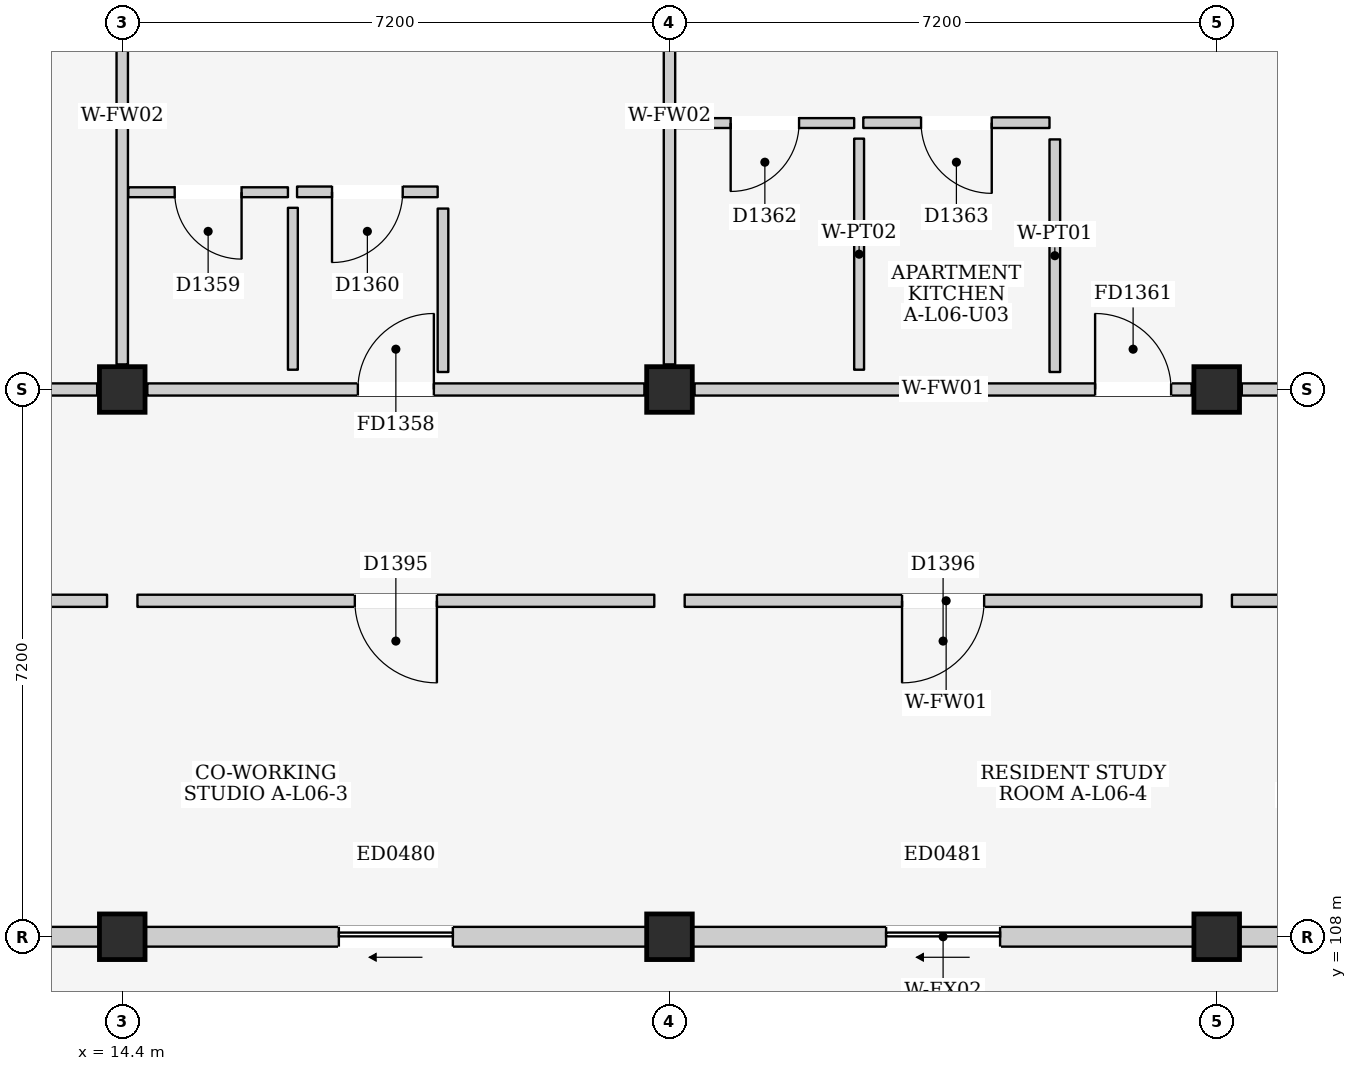
"""IFC4 building model, lengths in metres.
Left out: names, types, materials, properties, quantities, classifications, styles, units other than length and angle.
Written with IfcOpenShell. Run it as: python <this file> out.ifc"""

import sys

from ifc_helpers import new_model, si_unit, direction, frame, frame_2d, origin, origin_2d, place, context, subcontext, project, spatial, rectangle, extrude, element, fill, save


model = new_model("IFC4")
c1 = context("Model", 3, precision=1e-05, world=origin(), true_north=direction((0.0, 1.0)))
c2 = subcontext(c1, "Body", "Model", "MODEL_VIEW")
j1 = project(units=[si_unit("LENGTHUNIT", "METRE"), si_unit("PLANEANGLEUNIT", "RADIAN")], contexts=[c1])
p1 = place(None, origin())
s1 = spatial("IfcSite", under=j1, at=p1, CompositionType="ELEMENT")
p2 = place(p1, origin())
s2 = spatial("IfcBuilding", under=s1, at=p2, CompositionType="ELEMENT")
p3 = place(p2, frame((0.0, 0.0, 21.9)))
s3 = spatial("IfcBuildingStorey", under=s2, at=p3, CompositionType="ELEMENT", Elevation=21.9)
for number, where, z_axis, x_axis in (
    (1, (14.4, 108.0, 0.0), (0.0, 0.0, 1.0), (1.0, 0.0, 0.0)),
    (2, (14.4, 115.2, 0.0), (0.0, 0.0, 1.0), (1.0, 0.0, 0.0)),
    (3, (21.6, 108.0, 0.0), (0.0, 0.0, 1.0), (1.0, 0.0, 0.0)),
    (4, (21.6, 115.2, 0.0), (0.0, 0.0, 1.0), (1.0, 0.0, 0.0)),
    (5, (28.8, 108.0, 0.0), (0.0, 0.0, 1.0), (1.0, 0.0, 0.0)),
    (6, (28.8, 115.2, 0.0), (0.0, 0.0, 1.0), (1.0, 0.0, 0.0)),
):
    element("IfcColumn", number, at=place(p3, frame(where, z_axis=z_axis, x_axis=x_axis)), inside=s3, PredefinedType="COLUMN", context=c2, shape_type="SweptSolid", body=[
        extrude(rectangle(XDim=0.6, YDim=0.6, at=origin_2d()), origin(), (0.0, 0.0, 1.0), 3.2),
    ])
p4 = place(p3, frame((7.5, 108.0, 0.0), z_axis=(0.0, 0.0, 1.0), x_axis=(1.0, 0.0, 0.0)))
e7 = element("IfcWall", 7, at=p4, inside=s3, PredefinedType="ELEMENTEDWALL", context=c2, shape_type="SweptSolid", body=[
    extrude(rectangle(XDim=6.6, YDim=0.26, at=frame_2d((3.3, 0.0))), origin(), (0.0, 0.0, 1.0), 2.315),
])
p5 = place(p4, frame((2.55, 0.0, 0.0)))
e8 = element("IfcOpeningElement", 8, at=p5, cuts=e7, PredefinedType="OPENING", context=c2, shape_type="SweptSolid", body=[
    extrude(rectangle(XDim=1.5, YDim=2.12, at=frame_2d((0.75, 1.06))), frame((0.0, 0.145, 0.0), z_axis=(0.0, -1.0, 0.0), x_axis=(1.0, 0.0, 0.0)), (0.0, 0.0, 1.0), 0.29),
])
p6 = place(p3, frame((14.7, 108.0, 0.0), z_axis=(0.0, 0.0, 1.0), x_axis=(1.0, 0.0, 0.0)))
e9 = element("IfcWall", 9, at=p6, inside=s3, PredefinedType="ELEMENTEDWALL", context=c2, shape_type="SweptSolid", body=[
    extrude(rectangle(XDim=6.6, YDim=0.26, at=frame_2d((3.3, 0.0))), origin(), (0.0, 0.0, 1.0), 2.315),
])
p7 = place(p6, frame((2.55, 0.0, 0.0)))
e10 = element("IfcOpeningElement", 10, at=p7, cuts=e9, PredefinedType="OPENING", context=c2, shape_type="SweptSolid", body=[
    extrude(rectangle(XDim=1.5, YDim=2.12, at=frame_2d((0.75, 1.06))), frame((0.0, 0.145, 0.0), z_axis=(0.0, -1.0, 0.0), x_axis=(1.0, 0.0, 0.0)), (0.0, 0.0, 1.0), 0.29),
])
p8 = place(p3, frame((21.9, 108.0, 0.0), z_axis=(0.0, 0.0, 1.0), x_axis=(1.0, 0.0, 0.0)))
e11 = element("IfcWall", 11, at=p8, inside=s3, PredefinedType="ELEMENTEDWALL", context=c2, shape_type="SweptSolid", body=[
    extrude(rectangle(XDim=6.6, YDim=0.26, at=frame_2d((3.3, 0.0))), origin(), (0.0, 0.0, 1.0), 2.315),
])
p9 = place(p8, frame((2.55, 0.0, 0.0)))
e12 = element("IfcOpeningElement", 12, at=p9, cuts=e11, PredefinedType="OPENING", context=c2, shape_type="SweptSolid", body=[
    extrude(rectangle(XDim=1.5, YDim=2.12, at=frame_2d((0.75, 1.06))), frame((0.0, 0.145, 0.0), z_axis=(0.0, -1.0, 0.0), x_axis=(1.0, 0.0, 0.0)), (0.0, 0.0, 1.0), 0.29),
])
p10 = place(p3, frame((29.1, 108.0, 0.0), z_axis=(0.0, 0.0, 1.0), x_axis=(1.0, 0.0, 0.0)))
e13 = element("IfcWall", 13, at=p10, inside=s3, PredefinedType="ELEMENTEDWALL", context=c2, shape_type="SweptSolid", body=[
    extrude(rectangle(XDim=6.6, YDim=0.26, at=frame_2d((3.3, 0.0))), origin(), (0.0, 0.0, 1.0), 2.315),
])
p11 = place(p10, frame((2.55, 0.0, 0.0)))
e14 = element("IfcOpeningElement", 14, at=p11, cuts=e13, PredefinedType="OPENING", context=c2, shape_type="SweptSolid", body=[
    extrude(rectangle(XDim=1.5, YDim=2.12, at=frame_2d((0.75, 1.06))), frame((0.0, 0.145, 0.0), z_axis=(0.0, -1.0, 0.0), x_axis=(1.0, 0.0, 0.0)), (0.0, 0.0, 1.0), 0.29),
])
p12 = place(p3, frame((7.53, 115.2, 0.0), z_axis=(0.0, 0.0, 1.0), x_axis=(1.0, 0.0, 0.0)))
e15 = element("IfcWall", 15, at=p12, inside=s3, PredefinedType="PARTITIONING", context=c2, shape_type="SweptSolid", body=[
    extrude(rectangle(XDim=6.54, YDim=0.16, at=frame_2d((3.27, 0.0))), origin(), (0.0, 0.0, 1.0), 2.315),
])
p13 = place(p12, frame((2.77, 0.0, 0.0)))
e16 = element("IfcOpeningElement", 16, at=p13, cuts=e15, PredefinedType="OPENING", context=c2, shape_type="SweptSolid", body=[
    extrude(rectangle(XDim=1.0, YDim=2.15, at=frame_2d((0.5, 1.075))), frame((0.0, 0.095, 0.0), z_axis=(0.0, -1.0, 0.0), x_axis=(1.0, 0.0, 0.0)), (0.0, 0.0, 1.0), 0.19),
])
p14 = place(p3, frame((14.4, 115.53, 0.0), z_axis=(0.0, 0.0, 1.0), x_axis=(0.0, 1.0, 0.0)))
e17 = element("IfcWall", 17, at=p14, inside=s3, PredefinedType="PARTITIONING", context=c2, shape_type="SweptSolid", body=[
    extrude(rectangle(XDim=6.54, YDim=0.15, at=frame_2d((3.27, 0.0))), origin(), (0.0, 0.0, 1.0), 2.465),
])
p15 = place(p3, frame((14.73, 115.2, 0.0), z_axis=(0.0, 0.0, 1.0), x_axis=(1.0, 0.0, 0.0)))
e18 = element("IfcWall", 18, at=p15, inside=s3, PredefinedType="PARTITIONING", context=c2, shape_type="SweptSolid", body=[
    extrude(rectangle(XDim=6.54, YDim=0.16, at=frame_2d((3.27, 0.0))), origin(), (0.0, 0.0, 1.0), 2.315),
])
p16 = place(p15, frame((2.77, 0.0, 0.0)))
e19 = element("IfcOpeningElement", 19, at=p16, cuts=e18, PredefinedType="OPENING", context=c2, shape_type="SweptSolid", body=[
    extrude(rectangle(XDim=1.0, YDim=2.15, at=frame_2d((0.5, 1.075))), frame((0.0, 0.095, 0.0), z_axis=(0.0, -1.0, 0.0), x_axis=(1.0, 0.0, 0.0)), (0.0, 0.0, 1.0), 0.19),
])
p17 = place(p3, frame((21.6, 115.53, 0.0), z_axis=(0.0, 0.0, 1.0), x_axis=(0.0, 1.0, 0.0)))
e20 = element("IfcWall", 20, at=p17, inside=s3, PredefinedType="PARTITIONING", context=c2, shape_type="SweptSolid", body=[
    extrude(rectangle(XDim=6.54, YDim=0.15, at=frame_2d((3.27, 0.0))), origin(), (0.0, 0.0, 1.0), 2.465),
])
p18 = place(p3, frame((14.48, 117.795, 0.0), z_axis=(0.0, 0.0, 1.0), x_axis=(1.0, 0.0, 0.0)))
e21 = element("IfcWall", 21, at=p18, inside=s3, PredefinedType="PARTITIONING", context=c2, shape_type="SweptSolid", body=[
    extrude(rectangle(XDim=2.1, YDim=0.13, at=frame_2d((1.05, 0.0))), origin(), (0.0, 0.0, 1.0), 2.98),
])
p19 = place(p18, frame((0.61, 0.0, 0.0)))
e22 = element("IfcOpeningElement", 22, at=p19, cuts=e21, PredefinedType="OPENING", context=c2, shape_type="SweptSolid", body=[
    extrude(rectangle(XDim=0.88, YDim=2.1, at=frame_2d((0.44, 1.05))), frame((0.0, 0.08, 0.0), z_axis=(0.0, -1.0, 0.0), x_axis=(1.0, 0.0, 0.0)), (0.0, 0.0, 1.0), 0.16),
])
p20 = place(p3, frame((16.645, 115.46, 0.0), z_axis=(0.0, 0.0, 1.0), x_axis=(0.0, 1.0, 0.0)))
e23 = element("IfcWall", 23, at=p20, inside=s3, PredefinedType="PARTITIONING", context=c2, shape_type="SweptSolid", body=[
    extrude(rectangle(XDim=2.13, YDim=0.13, at=frame_2d((1.065, 0.0))), origin(), (0.0, 0.0, 1.0), 2.98),
])
p21 = place(p3, frame((16.7, 117.8, 0.0), z_axis=(0.0, 0.0, 1.0), x_axis=(1.0, 0.0, 0.0)))
e24 = element("IfcWall", 24, at=p21, inside=s3, PredefinedType="PARTITIONING", context=c2, shape_type="SweptSolid", body=[
    extrude(rectangle(XDim=1.85, YDim=0.14, at=frame_2d((0.925, 0.0))), origin(), (0.0, 0.0, 1.0), 2.98),
])
p22 = place(p21, frame((0.46, 0.0, 0.0)))
e25 = element("IfcOpeningElement", 25, at=p22, cuts=e24, PredefinedType="OPENING", context=c2, shape_type="SweptSolid", body=[
    extrude(rectangle(XDim=0.93, YDim=2.14, at=frame_2d((0.465, 1.07))), frame((0.0, 0.085, 0.0), z_axis=(0.0, -1.0, 0.0), x_axis=(1.0, 0.0, 0.0)), (0.0, 0.0, 1.0), 0.17),
])
p23 = place(p3, frame((18.62, 115.43, 0.0), z_axis=(0.0, 0.0, 1.0), x_axis=(0.0, 1.0, 0.0)))
e26 = element("IfcWall", 26, at=p23, inside=s3, PredefinedType="PARTITIONING", context=c2, shape_type="SweptSolid", body=[
    extrude(rectangle(XDim=2.15, YDim=0.14, at=frame_2d((1.075, 0.0))), origin(), (0.0, 0.0, 1.0), 2.98),
])
p24 = place(p3, frame((21.93, 115.2, 0.0), z_axis=(0.0, 0.0, 1.0), x_axis=(1.0, 0.0, 0.0)))
e27 = element("IfcWall", 27, at=p24, inside=s3, PredefinedType="PARTITIONING", context=c2, shape_type="SweptSolid", body=[
    extrude(rectangle(XDim=6.54, YDim=0.16, at=frame_2d((3.27, 0.0))), origin(), (0.0, 0.0, 1.0), 2.315),
])
p25 = place(p24, frame((5.27, 0.0, 0.0)))
e28 = element("IfcOpeningElement", 28, at=p25, cuts=e27, PredefinedType="OPENING", context=c2, shape_type="SweptSolid", body=[
    extrude(rectangle(XDim=1.0, YDim=2.15, at=frame_2d((0.5, 1.075))), frame((0.0, 0.095, 0.0), z_axis=(0.0, -1.0, 0.0), x_axis=(1.0, 0.0, 0.0)), (0.0, 0.0, 1.0), 0.19),
])
p26 = place(p3, frame((29.13, 115.2, 0.0), z_axis=(0.0, 0.0, 1.0), x_axis=(1.0, 0.0, 0.0)))
e29 = element("IfcWall", 29, at=p26, inside=s3, PredefinedType="PARTITIONING", context=c2, shape_type="SweptSolid", body=[
    extrude(rectangle(XDim=6.54, YDim=0.16, at=frame_2d((3.27, 0.0))), origin(), (0.0, 0.0, 1.0), 2.315),
])
p27 = place(p3, frame((21.68, 118.705, 0.0), z_axis=(0.0, 0.0, 1.0), x_axis=(1.0, 0.0, 0.0)))
e30 = element("IfcWall", 30, at=p27, inside=s3, PredefinedType="PARTITIONING", context=c2, shape_type="SweptSolid", body=[
    extrude(rectangle(XDim=2.35, YDim=0.13, at=frame_2d((1.175, 0.0))), origin(), (0.0, 0.0, 1.0), 2.98),
])
p28 = place(p27, frame((0.725, 0.0, 0.0)))
e31 = element("IfcOpeningElement", 31, at=p28, cuts=e30, PredefinedType="OPENING", context=c2, shape_type="SweptSolid", body=[
    extrude(rectangle(XDim=0.9, YDim=2.1, at=frame_2d((0.45, 1.05))), frame((0.0, 0.08, 0.0), z_axis=(0.0, -1.0, 0.0), x_axis=(1.0, 0.0, 0.0)), (0.0, 0.0, 1.0), 0.16),
])
p29 = place(p3, frame((24.095, 115.46, 0.0), z_axis=(0.0, 0.0, 1.0), x_axis=(0.0, 1.0, 0.0)))
e32 = element("IfcWall", 32, at=p29, inside=s3, PredefinedType="PARTITIONING", context=c2, shape_type="SweptSolid", body=[
    extrude(rectangle(XDim=3.04, YDim=0.13, at=frame_2d((1.52, 0.0))), origin(), (0.0, 0.0, 1.0), 2.98),
])
p30 = place(p3, frame((24.15, 118.71, 0.0), z_axis=(0.0, 0.0, 1.0), x_axis=(1.0, 0.0, 0.0)))
e33 = element("IfcWall", 33, at=p30, inside=s3, PredefinedType="PARTITIONING", context=c2, shape_type="SweptSolid", body=[
    extrude(rectangle(XDim=2.45, YDim=0.14, at=frame_2d((1.225, 0.0))), origin(), (0.0, 0.0, 1.0), 2.98),
])
p31 = place(p30, frame((0.76, 0.0, 0.0)))
e34 = element("IfcOpeningElement", 34, at=p31, cuts=e33, PredefinedType="OPENING", context=c2, shape_type="SweptSolid", body=[
    extrude(rectangle(XDim=0.93, YDim=2.14, at=frame_2d((0.465, 1.07))), frame((0.0, 0.085, 0.0), z_axis=(0.0, -1.0, 0.0), x_axis=(1.0, 0.0, 0.0)), (0.0, 0.0, 1.0), 0.17),
])
p32 = place(p3, frame((26.67, 115.43, 0.0), z_axis=(0.0, 0.0, 1.0), x_axis=(0.0, 1.0, 0.0)))
e35 = element("IfcWall", 35, at=p32, inside=s3, PredefinedType="PARTITIONING", context=c2, shape_type="SweptSolid", body=[
    extrude(rectangle(XDim=3.06, YDim=0.14, at=frame_2d((1.53, 0.0))), origin(), (0.0, 0.0, 1.0), 2.98),
])
p33 = place(p3, frame((7.48, 112.42, 0.0), z_axis=(0.0, 0.0, 1.0), x_axis=(1.0, 0.0, 0.0)))
e36 = element("IfcWall", 36, at=p33, inside=s3, PredefinedType="PARTITIONING", context=c2, shape_type="SweptSolid", body=[
    extrude(rectangle(XDim=6.72, YDim=0.16, at=frame_2d((3.36, 0.0))), origin(), (0.0, 0.0, 1.0), 2.98),
])
p34 = place(p33, frame((2.82, 0.0, 0.0)))
e37 = element("IfcOpeningElement", 37, at=p34, cuts=e36, PredefinedType="OPENING", context=c2, shape_type="SweptSolid", body=[
    extrude(rectangle(XDim=1.08, YDim=2.22, at=frame_2d((0.54, 1.11))), frame((0.0, 0.095, 0.0), z_axis=(0.0, -1.0, 0.0), x_axis=(1.0, 0.0, 0.0)), (0.0, 0.0, 1.0), 0.19),
])
p35 = place(p3, frame((14.6, 112.42, 0.0), z_axis=(0.0, 0.0, 1.0), x_axis=(1.0, 0.0, 0.0)))
e38 = element("IfcWall", 38, at=p35, inside=s3, PredefinedType="PARTITIONING", context=c2, shape_type="SweptSolid", body=[
    extrude(rectangle(XDim=6.8, YDim=0.16, at=frame_2d((3.4, 0.0))), origin(), (0.0, 0.0, 1.0), 2.98),
])
p36 = place(p35, frame((2.86, 0.0, 0.0)))
e39 = element("IfcOpeningElement", 39, at=p36, cuts=e38, PredefinedType="OPENING", context=c2, shape_type="SweptSolid", body=[
    extrude(rectangle(XDim=1.08, YDim=2.22, at=frame_2d((0.54, 1.11))), frame((0.0, 0.095, 0.0), z_axis=(0.0, -1.0, 0.0), x_axis=(1.0, 0.0, 0.0)), (0.0, 0.0, 1.0), 0.19),
])
p37 = place(p3, frame((21.8, 112.42, 0.0), z_axis=(0.0, 0.0, 1.0), x_axis=(1.0, 0.0, 0.0)))
e40 = element("IfcWall", 40, at=p37, inside=s3, PredefinedType="PARTITIONING", context=c2, shape_type="SweptSolid", body=[
    extrude(rectangle(XDim=6.8, YDim=0.16, at=frame_2d((3.4, 0.0))), origin(), (0.0, 0.0, 1.0), 2.98),
])
p38 = place(p37, frame((2.86, 0.0, 0.0)))
e41 = element("IfcOpeningElement", 41, at=p38, cuts=e40, PredefinedType="OPENING", context=c2, shape_type="SweptSolid", body=[
    extrude(rectangle(XDim=1.08, YDim=2.22, at=frame_2d((0.54, 1.11))), frame((0.0, 0.095, 0.0), z_axis=(0.0, -1.0, 0.0), x_axis=(1.0, 0.0, 0.0)), (0.0, 0.0, 1.0), 0.19),
])
p39 = place(p3, frame((29.0, 112.42, 0.0), z_axis=(0.0, 0.0, 1.0), x_axis=(1.0, 0.0, 0.0)))
e42 = element("IfcWall", 42, at=p39, inside=s3, PredefinedType="PARTITIONING", context=c2, shape_type="SweptSolid", body=[
    extrude(rectangle(XDim=6.8, YDim=0.16, at=frame_2d((3.4, 0.0))), origin(), (0.0, 0.0, 1.0), 2.98),
])
p40 = place(p39, frame((2.86, 0.0, 0.0)))
e43 = element("IfcOpeningElement", 43, at=p40, cuts=e42, PredefinedType="OPENING", context=c2, shape_type="SweptSolid", body=[
    extrude(rectangle(XDim=1.08, YDim=2.22, at=frame_2d((0.54, 1.11))), frame((0.0, 0.095, 0.0), z_axis=(0.0, -1.0, 0.0), x_axis=(1.0, 0.0, 0.0)), (0.0, 0.0, 1.0), 0.19),
])
p41 = place(p7, frame((1.5, 0.0, 0.0), z_axis=(0.0, 0.0, 1.0), x_axis=(-1.0, 0.0, 0.0)))
e44 = element("IfcDoor", 44, at=p41, inside=s3, OperationType="SLIDING_TO_LEFT", PredefinedType="DOOR", context=c2, shape_type="SweptSolid", body=[
    extrude(rectangle(XDim=1.5, YDim=2.12, at=frame_2d((0.75, 1.06))), frame((0.0, 0.025, 0.0), z_axis=(0.0, -1.0, 0.0), x_axis=(1.0, 0.0, 0.0)), (0.0, 0.0, 1.0), 0.05),
])
fill(e10, e44)
p42 = place(p9, frame((1.5, 0.0, 0.0), z_axis=(0.0, 0.0, 1.0), x_axis=(-1.0, 0.0, 0.0)))
e45 = element("IfcDoor", 45, at=p42, inside=s3, OperationType="SLIDING_TO_LEFT", PredefinedType="DOOR", context=c2, shape_type="SweptSolid", body=[
    extrude(rectangle(XDim=1.5, YDim=2.12, at=frame_2d((0.75, 1.06))), frame((0.0, 0.025, 0.0), z_axis=(0.0, -1.0, 0.0), x_axis=(1.0, 0.0, 0.0)), (0.0, 0.0, 1.0), 0.05),
])
fill(e12, e45)
p43 = place(p16, origin())
e46 = element("IfcDoor", 46, at=p43, inside=s3, OperationType="SINGLE_SWING_RIGHT", PredefinedType="DOOR", context=c2, shape_type="SweptSolid", body=[
    extrude(rectangle(XDim=1.0, YDim=2.15, at=frame_2d((0.5, 1.075))), frame((0.0, 0.025, 0.0), z_axis=(0.0, -1.0, 0.0), x_axis=(1.0, 0.0, 0.0)), (0.0, 0.0, 1.0), 0.05),
])
fill(e19, e46)
p44 = place(p19, frame((0.88, 0.0, 0.0), z_axis=(0.0, 0.0, 1.0), x_axis=(-1.0, 0.0, 0.0)))
e47 = element("IfcDoor", 47, at=p44, inside=s3, OperationType="SINGLE_SWING_LEFT", PredefinedType="DOOR", context=c2, shape_type="SweptSolid", body=[
    extrude(rectangle(XDim=0.88, YDim=2.1, at=frame_2d((0.44, 1.05))), frame((0.0, 0.025, 0.0), z_axis=(0.0, -1.0, 0.0), x_axis=(1.0, 0.0, 0.0)), (0.0, 0.0, 1.0), 0.05),
])
fill(e22, e47)
p45 = place(p22, frame((0.93, 0.0, 0.0), z_axis=(0.0, 0.0, 1.0), x_axis=(-1.0, 0.0, 0.0)))
e48 = element("IfcDoor", 48, at=p45, inside=s3, OperationType="SINGLE_SWING_RIGHT", PredefinedType="DOOR", context=c2, shape_type="SweptSolid", body=[
    extrude(rectangle(XDim=0.93, YDim=2.14, at=frame_2d((0.465, 1.07))), frame((0.0, 0.025, 0.0), z_axis=(0.0, -1.0, 0.0), x_axis=(1.0, 0.0, 0.0)), (0.0, 0.0, 1.0), 0.05),
])
fill(e25, e48)
p46 = place(p25, origin())
e49 = element("IfcDoor", 49, at=p46, inside=s3, OperationType="SINGLE_SWING_LEFT", PredefinedType="DOOR", context=c2, shape_type="SweptSolid", body=[
    extrude(rectangle(XDim=1.0, YDim=2.15, at=frame_2d((0.5, 1.075))), frame((0.0, 0.025, 0.0), z_axis=(0.0, -1.0, 0.0), x_axis=(1.0, 0.0, 0.0)), (0.0, 0.0, 1.0), 0.05),
])
fill(e28, e49)
p47 = place(p28, frame((0.9, 0.0, 0.0), z_axis=(0.0, 0.0, 1.0), x_axis=(-1.0, 0.0, 0.0)))
e50 = element("IfcDoor", 50, at=p47, inside=s3, OperationType="SINGLE_SWING_RIGHT", PredefinedType="DOOR", context=c2, shape_type="SweptSolid", body=[
    extrude(rectangle(XDim=0.9, YDim=2.1, at=frame_2d((0.45, 1.05))), frame((0.0, 0.025, 0.0), z_axis=(0.0, -1.0, 0.0), x_axis=(1.0, 0.0, 0.0)), (0.0, 0.0, 1.0), 0.05),
])
fill(e31, e50)
p48 = place(p31, frame((0.93, 0.0, 0.0), z_axis=(0.0, 0.0, 1.0), x_axis=(-1.0, 0.0, 0.0)))
e51 = element("IfcDoor", 51, at=p48, inside=s3, OperationType="SINGLE_SWING_LEFT", PredefinedType="DOOR", context=c2, shape_type="SweptSolid", body=[
    extrude(rectangle(XDim=0.93, YDim=2.14, at=frame_2d((0.465, 1.07))), frame((0.0, 0.025, 0.0), z_axis=(0.0, -1.0, 0.0), x_axis=(1.0, 0.0, 0.0)), (0.0, 0.0, 1.0), 0.05),
])
fill(e34, e51)
p49 = place(p36, frame((1.08, 0.0, 0.0), z_axis=(0.0, 0.0, 1.0), x_axis=(-1.0, 0.0, 0.0)))
e52 = element("IfcDoor", 52, at=p49, inside=s3, OperationType="SINGLE_SWING_LEFT", PredefinedType="DOOR", context=c2, shape_type="SweptSolid", body=[
    extrude(rectangle(XDim=1.08, YDim=2.22, at=frame_2d((0.54, 1.11))), frame((0.0, 0.025, 0.0), z_axis=(0.0, -1.0, 0.0), x_axis=(1.0, 0.0, 0.0)), (0.0, 0.0, 1.0), 0.05),
])
fill(e39, e52)
p50 = place(p38, frame((1.08, 0.0, 0.0), z_axis=(0.0, 0.0, 1.0), x_axis=(-1.0, 0.0, 0.0)))
e53 = element("IfcDoor", 53, at=p50, inside=s3, OperationType="SINGLE_SWING_RIGHT", PredefinedType="DOOR", context=c2, shape_type="SweptSolid", body=[
    extrude(rectangle(XDim=1.08, YDim=2.22, at=frame_2d((0.54, 1.11))), frame((0.0, 0.025, 0.0), z_axis=(0.0, -1.0, 0.0), x_axis=(1.0, 0.0, 0.0)), (0.0, 0.0, 1.0), 0.05),
])
fill(e41, e53)
save(model, sys.argv[1])
